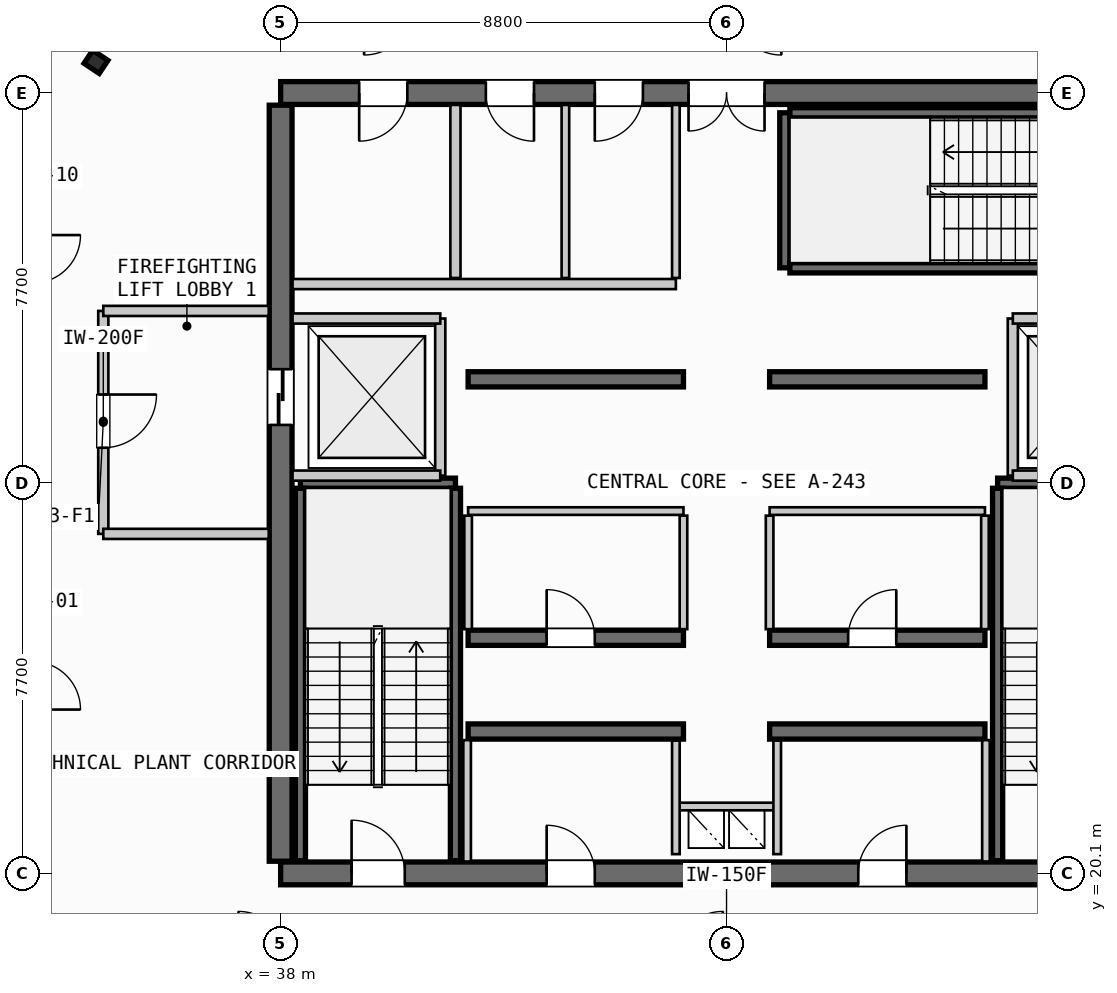
"""IFC4 building model, lengths in metres.
Left out: names, types, materials, properties, quantities, classifications, styles, units other than length and angle.
Written with IfcOpenShell. Run it as: python <this file> out.ifc"""

import sys

from ifc_helpers import new_model, si_unit, direction, frame, frame_2d, origin, origin_2d, place, context, subcontext, project, spatial, rectangle, i_section, extrude, source, transform, mapped, element, fill, save


model = new_model("IFC4")
c1 = context("Model", 3, precision=1e-05, world=origin(), true_north=direction((0.0, 1.0)))
c2 = subcontext(c1, "Body", "Model", "MODEL_VIEW")
j1 = project(units=[si_unit("LENGTHUNIT", "METRE"), si_unit("PLANEANGLEUNIT", "RADIAN")], contexts=[c1])
p1 = place(None, origin())
s1 = spatial("IfcSite", under=j1, at=p1, CompositionType="ELEMENT")
p2 = place(p1, origin())
s2 = spatial("IfcBuilding", under=s1, at=p2, CompositionType="ELEMENT")
p3 = place(p2, frame((0.0, 0.0, 312.3)))
s3 = spatial("IfcBuildingStorey", under=s2, at=p3, CompositionType="ELEMENT", Elevation=312.3)
p4 = place(p3, frame((38.0, 20.1, 0.0), z_axis=(0.0, 0.0, 1.0), x_axis=(1.0, 0.0, 0.0)))
e1 = element("IfcWall", 1, at=p4, inside=s3, PredefinedType="SHEAR", context=c2, shape_type="SweptSolid", body=[
    extrude(rectangle(XDim=17.6, YDim=0.45, at=frame_2d((8.8, 0.0))), origin(), (0.0, 0.0, 1.0), 3.735),
])
p5 = place(p4, frame((1.4, 0.0, 0.0)))
e2 = element("IfcOpeningElement", 2, at=p5, cuts=e1, PredefinedType="OPENING", context=c2, shape_type="SweptSolid", body=[
    extrude(rectangle(XDim=1.05, YDim=2.15, at=frame_2d((0.525, 1.075))), frame((0.0, 0.235, 0.0), z_axis=(0.0, -1.0, 0.0), x_axis=(1.0, 0.0, 0.0)), (0.0, 0.0, 1.0), 0.47),
])
p6 = place(p4, frame((15.15, 0.0, 0.0)))
e3 = element("IfcOpeningElement", 3, at=p6, cuts=e1, PredefinedType="OPENING", context=c2, shape_type="SweptSolid", body=[
    extrude(rectangle(XDim=1.05, YDim=2.15, at=frame_2d((0.525, 1.075))), frame((0.0, 0.235, 0.0), z_axis=(0.0, -1.0, 0.0), x_axis=(1.0, 0.0, 0.0)), (0.0, 0.0, 1.0), 0.47),
])
p7 = place(p4, frame((5.25, 0.0, 0.0)))
e4 = element("IfcOpeningElement", 4, at=p7, cuts=e1, PredefinedType="OPENING", context=c2, shape_type="SweptSolid", body=[
    extrude(rectangle(XDim=0.95, YDim=2.15, at=frame_2d((0.475, 1.075))), frame((0.0, 0.235, 0.0), z_axis=(0.0, -1.0, 0.0), x_axis=(1.0, 0.0, 0.0)), (0.0, 0.0, 1.0), 0.47),
])
p8 = place(p4, frame((11.4, 0.0, 0.0)))
e5 = element("IfcOpeningElement", 5, at=p8, cuts=e1, PredefinedType="OPENING", context=c2, shape_type="SweptSolid", body=[
    extrude(rectangle(XDim=0.95, YDim=2.15, at=frame_2d((0.475, 1.075))), frame((0.0, 0.235, 0.0), z_axis=(0.0, -1.0, 0.0), x_axis=(1.0, 0.0, 0.0)), (0.0, 0.0, 1.0), 0.47),
])
p9 = place(p3, frame((55.6, 35.5, 0.0), z_axis=(0.0, 0.0, 1.0), x_axis=(-1.0, 0.0, 0.0)))
e6 = element("IfcWall", 6, at=p9, inside=s3, PredefinedType="SHEAR", context=c2, shape_type="SweptSolid", body=[
    extrude(rectangle(XDim=17.6, YDim=0.45, at=frame_2d((8.8, 0.0))), origin(), (0.0, 0.0, 1.0), 3.735),
])
p10 = place(p9, frame((8.05, 0.0, 0.0)))
e7 = element("IfcOpeningElement", 7, at=p10, cuts=e6, PredefinedType="OPENING", context=c2, shape_type="SweptSolid", body=[
    extrude(rectangle(XDim=1.5, YDim=2.2, at=frame_2d((0.75, 1.1))), frame((0.0, 0.235, 0.0), z_axis=(0.0, -1.0, 0.0), x_axis=(1.0, 0.0, 0.0)), (0.0, 0.0, 1.0), 0.47),
])
p11 = place(p9, frame((15.1, 0.0, 0.0)))
e8 = element("IfcOpeningElement", 8, at=p11, cuts=e6, PredefinedType="OPENING", context=c2, shape_type="SweptSolid", body=[
    extrude(rectangle(XDim=0.95, YDim=2.15, at=frame_2d((0.475, 1.075))), frame((0.0, 0.235, 0.0), z_axis=(0.0, -1.0, 0.0), x_axis=(1.0, 0.0, 0.0)), (0.0, 0.0, 1.0), 0.47),
])
p12 = place(p9, frame((12.6, 0.0, 0.0)))
e9 = element("IfcOpeningElement", 9, at=p12, cuts=e6, PredefinedType="OPENING", context=c2, shape_type="SweptSolid", body=[
    extrude(rectangle(XDim=0.95, YDim=2.15, at=frame_2d((0.475, 1.075))), frame((0.0, 0.235, 0.0), z_axis=(0.0, -1.0, 0.0), x_axis=(1.0, 0.0, 0.0)), (0.0, 0.0, 1.0), 0.47),
])
p13 = place(p9, frame((10.45, 0.0, 0.0)))
e10 = element("IfcOpeningElement", 10, at=p13, cuts=e6, PredefinedType="OPENING", context=c2, shape_type="SweptSolid", body=[
    extrude(rectangle(XDim=0.95, YDim=2.15, at=frame_2d((0.475, 1.075))), frame((0.0, 0.235, 0.0), z_axis=(0.0, -1.0, 0.0), x_axis=(1.0, 0.0, 0.0)), (0.0, 0.0, 1.0), 0.47),
])
p14 = place(p3, frame((38.0, 35.26, 0.0), z_axis=(0.0, 0.0, 1.0), x_axis=(0.0, -1.0, 0.0)))
e11 = element("IfcWall", 11, at=p14, inside=s3, PredefinedType="SHEAR", context=c2, shape_type="SweptSolid", body=[
    extrude(rectangle(XDim=14.92, YDim=0.45, at=frame_2d((7.46, 0.0))), origin(), (0.0, 0.0, 1.0), 3.735),
])
p15 = place(p14, frame((5.21, 0.0, 0.0)))
e12 = element("IfcOpeningElement", 12, at=p15, cuts=e11, PredefinedType="OPENING", context=c2, shape_type="SweptSolid", body=[
    extrude(rectangle(XDim=1.1, YDim=2.2, at=frame_2d((0.55, 1.1))), frame((0.0, 0.235, 0.0), z_axis=(0.0, -1.0, 0.0), x_axis=(1.0, 0.0, 0.0)), (0.0, 0.0, 1.0), 0.47),
])
for number, where, z_axis, x_axis in (
    (13, (41.7, 22.9, 0.0), (0.0, 0.0, 1.0), (1.0, 0.0, 0.0)),
    (14, (47.65, 22.9, 0.0), (0.0, 0.0, 1.0), (1.0, 0.0, 0.0)),
):
    element("IfcWall", number, at=place(p3, frame(where, z_axis=z_axis, x_axis=x_axis)), inside=s3, PredefinedType="SHEAR", context=c2, shape_type="SweptSolid", body=[
        extrude(rectangle(XDim=4.25, YDim=0.3, at=frame_2d((2.125, 0.0))), origin(), (0.0, 0.0, 1.0), 3.735),
    ])
p16 = place(p3, frame((41.7, 24.75, 0.0), z_axis=(0.0, 0.0, 1.0), x_axis=(1.0, 0.0, 0.0)))
e15 = element("IfcWall", 15, at=p16, inside=s3, PredefinedType="SHEAR", context=c2, shape_type="SweptSolid", body=[
    extrude(rectangle(XDim=4.25, YDim=0.3, at=frame_2d((2.125, 0.0))), origin(), (0.0, 0.0, 1.0), 3.735),
])
p17 = place(p16, frame((1.55, 0.0, 0.0)))
e16 = element("IfcOpeningElement", 16, at=p17, cuts=e15, PredefinedType="OPENING", context=c2, shape_type="SweptSolid", body=[
    extrude(rectangle(XDim=0.95, YDim=2.15, at=frame_2d((0.475, 1.075))), frame((0.0, 0.16, 0.0), z_axis=(0.0, -1.0, 0.0), x_axis=(1.0, 0.0, 0.0)), (0.0, 0.0, 1.0), 0.32),
])
p18 = place(p3, frame((47.65, 24.75, 0.0), z_axis=(0.0, 0.0, 1.0), x_axis=(1.0, 0.0, 0.0)))
e17 = element("IfcWall", 17, at=p18, inside=s3, PredefinedType="SHEAR", context=c2, shape_type="SweptSolid", body=[
    extrude(rectangle(XDim=4.25, YDim=0.3, at=frame_2d((2.125, 0.0))), origin(), (0.0, 0.0, 1.0), 3.735),
])
p19 = place(p18, frame((1.55, 0.0, 0.0)))
e18 = element("IfcOpeningElement", 18, at=p19, cuts=e17, PredefinedType="OPENING", context=c2, shape_type="SweptSolid", body=[
    extrude(rectangle(XDim=0.95, YDim=2.15, at=frame_2d((0.475, 1.075))), frame((0.0, 0.16, 0.0), z_axis=(0.0, -1.0, 0.0), x_axis=(1.0, 0.0, 0.0)), (0.0, 0.0, 1.0), 0.32),
])
for number, where, z_axis, x_axis in (
    (19, (41.7, 29.85, 0.0), (0.0, 0.0, 1.0), (1.0, 0.0, 0.0)),
    (20, (47.65, 29.85, 0.0), (0.0, 0.0, 1.0), (1.0, 0.0, 0.0)),
):
    element("IfcWall", number, at=place(p3, frame(where, z_axis=z_axis, x_axis=x_axis)), inside=s3, PredefinedType="SHEAR", context=c2, shape_type="SweptSolid", body=[
        extrude(rectangle(XDim=4.25, YDim=0.3, at=frame_2d((2.125, 0.0))), origin(), (0.0, 0.0, 1.0), 3.735),
    ])
m1 = source(origin(), c2, "Body", "SweptSolid", [
    extrude(i_section(OverallWidth=0.309, OverallDepth=0.359, WebThickness=0.016, FlangeThickness=0.026, FilletRadius=0.027, at=origin_2d()), origin(), (0.0, 0.0, 1.0), 3.735),
])
p20 = place(p3, frame((34.356, 36.115, 0.0), z_axis=(0.0, 0.0, 1.0), x_axis=(-0.831469612303, 0.55557023302, 0.0)))
e21 = element("IfcColumn", 21, at=p20, inside=s3, PredefinedType="COLUMN", context=c2, shape_type="MappedRepresentation", body=[
    mapped(m1, transform((0.0, 0.0, 0.0), scale=1.0)),
])
p21 = place(p3, frame((38.39, 27.8, 0.0), z_axis=(0.0, 0.0, 1.0), x_axis=(1.0, 0.0, 0.0)))
e22 = element("IfcWall", 22, at=p21, inside=s3, PredefinedType="SHEAR", context=c2, shape_type="SweptSolid", body=[
    extrude(rectangle(XDim=3.06, YDim=0.2, at=frame_2d((1.53, 0.0))), origin(), (0.0, 0.0, 1.0), 3.735),
])
for number, where, z_axis, x_axis in (
    (23, (41.45, 27.7, 0.0), (0.0, 0.0, 1.0), (0.0, -1.0, 0.0)),
    (24, (38.39, 20.35, 0.0), (0.0, 0.0, 1.0), (0.0, 1.0, 0.0)),
):
    element("IfcWall", number, at=place(p3, frame(where, z_axis=z_axis, x_axis=x_axis)), inside=s3, PredefinedType="SHEAR", context=c2, shape_type="SweptSolid", body=[
        extrude(rectangle(XDim=7.35, YDim=0.2, at=frame_2d((3.675, 0.0))), origin(), (0.0, 0.0, 1.0), 3.735),
    ])
p22 = place(p3, frame((52.15, 27.8, 0.0), z_axis=(0.0, 0.0, 1.0), x_axis=(1.0, 0.0, 0.0)))
e25 = element("IfcWall", 25, at=p22, inside=s3, PredefinedType="SHEAR", context=c2, shape_type="SweptSolid", body=[
    extrude(rectangle(XDim=3.06, YDim=0.2, at=frame_2d((1.53, 0.0))), origin(), (0.0, 0.0, 1.0), 3.735),
])
p23 = place(p3, frame((52.15, 20.35, 0.0), z_axis=(0.0, 0.0, 1.0), x_axis=(0.0, 1.0, 0.0)))
e26 = element("IfcWall", 26, at=p23, inside=s3, PredefinedType="SHEAR", context=c2, shape_type="SweptSolid", body=[
    extrude(rectangle(XDim=7.35, YDim=0.2, at=frame_2d((3.675, 0.0))), origin(), (0.0, 0.0, 1.0), 3.735),
])
p24 = place(p3, frame((47.95, 32.05, 0.0), z_axis=(0.0, 0.0, 1.0), x_axis=(0.0, 1.0, 0.0)))
e27 = element("IfcWall", 27, at=p24, inside=s3, PredefinedType="SHEAR", context=c2, shape_type="SweptSolid", body=[
    extrude(rectangle(XDim=3.06, YDim=0.2, at=frame_2d((1.53, 0.0))), origin(), (0.0, 0.0, 1.0), 3.735),
])
for number, where, z_axis, x_axis in (
    (28, (48.05, 35.11, 0.0), (0.0, 0.0, 1.0), (1.0, 0.0, 0.0)),
    (29, (55.4, 32.05, 0.0), (0.0, 0.0, 1.0), (-1.0, 0.0, 0.0)),
):
    element("IfcWall", number, at=place(p3, frame(where, z_axis=z_axis, x_axis=x_axis)), inside=s3, PredefinedType="SHEAR", context=c2, shape_type="SweptSolid", body=[
        extrude(rectangle(XDim=7.35, YDim=0.2, at=frame_2d((3.675, 0.0))), origin(), (0.0, 0.0, 1.0), 3.735),
    ])
p25 = place(p3, frame((45.8, 21.42, 0.0), z_axis=(0.0, 0.0, 1.0), x_axis=(1.0, 0.0, 0.0)))
e30 = element("IfcWall", 30, at=p25, inside=s3, PredefinedType="PARTITIONING", context=c2, shape_type="SweptSolid", body=[
    extrude(rectangle(XDim=2.0, YDim=0.15, at=frame_2d((1.0, 0.0))), origin(), (0.0, 0.0, 1.0), 3.26),
])
for number, where, z_axis, x_axis in (
    (31, (45.8, 20.48, 0.0), (0.0, 0.0, 1.0), (0.0, 1.0, 0.0)),
    (32, (47.8, 20.48, 0.0), (0.0, 0.0, 1.0), (0.0, 1.0, 0.0)),
):
    element("IfcWall", number, at=place(p3, frame(where, z_axis=z_axis, x_axis=x_axis)), inside=s3, PredefinedType="PARTITIONING", context=c2, shape_type="SweptSolid", body=[
        extrude(rectangle(XDim=2.24, YDim=0.15, at=frame_2d((1.12, 0.0))), origin(), (0.0, 0.0, 1.0), 3.26),
    ])
p26 = place(p3, frame((41.15, 27.95, 0.0), z_axis=(0.0, 0.0, 1.0), x_axis=(0.0, 1.0, 0.0)))
e33 = element("IfcWall", 33, at=p26, inside=s3, PredefinedType="PARTITIONING", context=c2, shape_type="SweptSolid", body=[
    extrude(rectangle(XDim=3.1, YDim=0.2, at=frame_2d((1.55, 0.0))), origin(), (0.0, 0.0, 1.0), 3.26),
])
for number, where, z_axis, x_axis in (
    (34, (38.235, 27.95, 0.0), (0.0, 0.0, 1.0), (1.0, 0.0, 0.0)),
    (35, (38.235, 31.05, 0.0), (0.0, 0.0, 1.0), (1.0, 0.0, 0.0)),
):
    element("IfcWall", number, at=place(p3, frame(where, z_axis=z_axis, x_axis=x_axis)), inside=s3, PredefinedType="PARTITIONING", context=c2, shape_type="SweptSolid", body=[
        extrude(rectangle(XDim=2.915, YDim=0.2, at=frame_2d((1.458, 0.0))), origin(), (0.0, 0.0, 1.0), 3.26),
    ])
p27 = place(p3, frame((34.5, 31.2, 0.0), z_axis=(0.0, 0.0, 1.0), x_axis=(0.0, -1.0, 0.0)))
e36 = element("IfcWall", 36, at=p27, inside=s3, PredefinedType="PARTITIONING", context=c2, shape_type="SweptSolid", body=[
    extrude(rectangle(XDim=4.4, YDim=0.2, at=frame_2d((2.2, 0.0))), origin(), (0.0, 0.0, 1.0), 3.26),
])
p28 = place(p27, frame((1.65, 0.0, 0.0)))
e37 = element("IfcOpeningElement", 37, at=p28, cuts=e36, PredefinedType="OPENING", context=c2, shape_type="SweptSolid", body=[
    extrude(rectangle(XDim=1.05, YDim=2.15, at=frame_2d((0.525, 1.075))), frame((0.0, 0.11, 0.0), z_axis=(0.0, -1.0, 0.0), x_axis=(1.0, 0.0, 0.0)), (0.0, 0.0, 1.0), 0.22),
])
for number, where, z_axis, x_axis in (
    (38, (34.5, 26.8, 0.0), (0.0, 0.0, 1.0), (1.0, 0.0, 0.0)),
    (39, (34.5, 31.2, 0.0), (0.0, 0.0, 1.0), (1.0, 0.0, 0.0)),
):
    element("IfcWall", number, at=place(p3, frame(where, z_axis=z_axis, x_axis=x_axis)), inside=s3, PredefinedType="PARTITIONING", context=c2, shape_type="SweptSolid", body=[
        extrude(rectangle(XDim=3.265, YDim=0.2, at=frame_2d((1.632, 0.0))), origin(), (0.0, 0.0, 1.0), 3.26),
    ])
p29 = place(p3, frame((52.45, 27.95, 0.0), z_axis=(0.0, 0.0, 1.0), x_axis=(0.0, 1.0, 0.0)))
e40 = element("IfcWall", 40, at=p29, inside=s3, PredefinedType="PARTITIONING", context=c2, shape_type="SweptSolid", body=[
    extrude(rectangle(XDim=3.1, YDim=0.2, at=frame_2d((1.55, 0.0))), origin(), (0.0, 0.0, 1.0), 3.26),
])
for number, where, z_axis, x_axis in (
    (41, (52.45, 27.95, 0.0), (0.0, 0.0, 1.0), (1.0, 0.0, 0.0)),
    (42, (52.45, 31.05, 0.0), (0.0, 0.0, 1.0), (1.0, 0.0, 0.0)),
):
    element("IfcWall", number, at=place(p3, frame(where, z_axis=z_axis, x_axis=x_axis)), inside=s3, PredefinedType="PARTITIONING", context=c2, shape_type="SweptSolid", body=[
        extrude(rectangle(XDim=2.915, YDim=0.2, at=frame_2d((1.458, 0.0))), origin(), (0.0, 0.0, 1.0), 3.26),
    ])
for number, where, z_axis, x_axis in (
    (43, (41.68, 20.335, 0.0), (0.0, 0.0, 1.0), (0.0, 1.0, 0.0)),
    (44, (51.92, 20.335, 0.0), (0.0, 0.0, 1.0), (0.0, 1.0, 0.0)),
):
    element("IfcWall", number, at=place(p3, frame(where, z_axis=z_axis, x_axis=x_axis)), inside=s3, PredefinedType="PARTITIONING", context=c2, shape_type="SweptSolid", body=[
        extrude(rectangle(XDim=2.395, YDim=0.15, at=frame_2d((1.198, 0.0))), origin(), (0.0, 0.0, 1.0), 3.26),
    ])
for number, where, z_axis, x_axis in (
    (45, (41.7, 27.25, 0.0), (0.0, 0.0, 1.0), (1.0, 0.0, 0.0)),
    (46, (47.65, 27.25, 0.0), (0.0, 0.0, 1.0), (1.0, 0.0, 0.0)),
):
    element("IfcWall", number, at=place(p3, frame(where, z_axis=z_axis, x_axis=x_axis)), inside=s3, PredefinedType="PARTITIONING", context=c2, shape_type="SweptSolid", body=[
        extrude(rectangle(XDim=4.25, YDim=0.15, at=frame_2d((2.125, 0.0))), origin(), (0.0, 0.0, 1.0), 3.26),
    ])
for number, where, z_axis, x_axis in (
    (47, (41.7, 24.92, 0.0), (0.0, 0.0, 1.0), (0.0, 1.0, 0.0)),
    (48, (45.95, 24.92, 0.0), (0.0, 0.0, 1.0), (0.0, 1.0, 0.0)),
    (49, (47.65, 24.92, 0.0), (0.0, 0.0, 1.0), (0.0, 1.0, 0.0)),
    (50, (51.9, 24.92, 0.0), (0.0, 0.0, 1.0), (0.0, 1.0, 0.0)),
):
    element("IfcWall", number, at=place(p3, frame(where, z_axis=z_axis, x_axis=x_axis)), inside=s3, PredefinedType="PARTITIONING", context=c2, shape_type="SweptSolid", body=[
        extrude(rectangle(XDim=2.24, YDim=0.15, at=frame_2d((1.12, 0.0))), origin(), (0.0, 0.0, 1.0), 3.26),
    ])
p30 = place(p3, frame((41.45, 31.85, 0.0), z_axis=(0.0, 0.0, 1.0), x_axis=(0.0, 1.0, 0.0)))
e51 = element("IfcWall", 51, at=p30, inside=s3, PredefinedType="PARTITIONING", context=c2, shape_type="SweptSolid", body=[
    extrude(rectangle(XDim=3.415, YDim=0.2, at=frame_2d((1.708, 0.0))), origin(), (0.0, 0.0, 1.0), 3.26),
])
p31 = place(p3, frame((38.235, 31.73, 0.0), z_axis=(0.0, 0.0, 1.0), x_axis=(1.0, 0.0, 0.0)))
e52 = element("IfcWall", 52, at=p31, inside=s3, PredefinedType="PARTITIONING", context=c2, shape_type="SweptSolid", body=[
    extrude(rectangle(XDim=7.565, YDim=0.2, at=frame_2d((3.782, 0.0))), origin(), (0.0, 0.0, 1.0), 3.26),
])
p32 = place(p3, frame((45.8, 31.85, 0.0), z_axis=(0.0, 0.0, 1.0), x_axis=(0.0, 1.0, 0.0)))
e53 = element("IfcWall", 53, at=p32, inside=s3, PredefinedType="PARTITIONING", context=c2, shape_type="SweptSolid", body=[
    extrude(rectangle(XDim=3.415, YDim=0.15, at=frame_2d((1.708, 0.0))), origin(), (0.0, 0.0, 1.0), 3.26),
])
p33 = place(p3, frame((43.62, 31.85, 0.0), z_axis=(0.0, 0.0, 1.0), x_axis=(0.0, 1.0, 0.0)))
e54 = element("IfcWall", 54, at=p33, inside=s3, PredefinedType="PLUMBINGWALL", context=c2, shape_type="SweptSolid", body=[
    extrude(rectangle(XDim=3.415, YDim=0.15, at=frame_2d((1.708, 0.0))), origin(), (0.0, 0.0, 1.0), 3.26),
])
m2 = source(origin(), c2, "Body", "SweptSolid", [
    extrude(rectangle(XDim=1.05, YDim=2.15, at=frame_2d((0.525, 1.075))), frame((0.0, 0.025, 0.0), z_axis=(0.0, -1.0, 0.0), x_axis=(1.0, 0.0, 0.0)), (0.0, 0.0, 1.0), 0.05),
])
p34 = place(p5, origin())
e55 = element("IfcDoor", 55, at=p34, inside=s3, OperationType="SINGLE_SWING_LEFT", PredefinedType="DOOR", context=c2, shape_type="MappedRepresentation", body=[
    mapped(m2, transform((0.0, 0.0, 0.0), scale=1.0)),
])
fill(e2, e55)
m3 = source(origin(), c2, "Body", "SweptSolid", [
    extrude(rectangle(XDim=1.5, YDim=2.2, at=frame_2d((0.75, 1.1))), frame((0.0, 0.025, 0.0), z_axis=(0.0, -1.0, 0.0), x_axis=(1.0, 0.0, 0.0)), (0.0, 0.0, 1.0), 0.05),
])
p35 = place(p10, origin())
e56 = element("IfcDoor", 56, at=p35, inside=s3, OperationType="DOUBLE_DOOR_SINGLE_SWING", PredefinedType="DOOR", context=c2, shape_type="MappedRepresentation", body=[
    mapped(m3, transform((0.0, 0.0, 0.0), scale=1.0)),
])
fill(e7, e56)
m4 = source(origin(), c2, "Body", "SweptSolid", [
    extrude(rectangle(XDim=1.1, YDim=2.2, at=frame_2d((0.55, 1.1))), frame((0.0, 0.025, 0.0), z_axis=(0.0, -1.0, 0.0), x_axis=(1.0, 0.0, 0.0)), (0.0, 0.0, 1.0), 0.05),
])
p36 = place(p15, origin())
e57 = element("IfcDoor", 57, at=p36, inside=s3, OperationType="SLIDING_TO_LEFT", PredefinedType="DOOR", context=c2, shape_type="MappedRepresentation", body=[
    mapped(m4, transform((0.0, 0.0, 0.0), scale=1.0)),
])
fill(e12, e57)
m5 = source(origin(), c2, "Body", "SweptSolid", [
    extrude(rectangle(XDim=0.95, YDim=2.15, at=frame_2d((0.475, 1.075))), frame((0.0, 0.025, 0.0), z_axis=(0.0, -1.0, 0.0), x_axis=(1.0, 0.0, 0.0)), (0.0, 0.0, 1.0), 0.05),
])
p37 = place(p7, origin())
e58 = element("IfcDoor", 58, at=p37, inside=s3, OperationType="SINGLE_SWING_LEFT", PredefinedType="DOOR", context=c2, shape_type="MappedRepresentation", body=[
    mapped(m5, transform((0.0, 0.0, 0.0), scale=1.0)),
])
fill(e4, e58)
p38 = place(p8, origin())
e59 = element("IfcDoor", 59, at=p38, inside=s3, OperationType="SINGLE_SWING_RIGHT", PredefinedType="DOOR", context=c2, shape_type="MappedRepresentation", body=[
    mapped(m5, transform((0.0, 0.0, 0.0), scale=1.0)),
])
fill(e5, e59)
p39 = place(p17, origin())
e60 = element("IfcDoor", 60, at=p39, inside=s3, OperationType="SINGLE_SWING_LEFT", PredefinedType="DOOR", context=c2, shape_type="MappedRepresentation", body=[
    mapped(m5, transform((0.0, 0.0, 0.0), scale=1.0)),
])
fill(e16, e60)
p40 = place(p19, origin())
e61 = element("IfcDoor", 61, at=p40, inside=s3, OperationType="SINGLE_SWING_RIGHT", PredefinedType="DOOR", context=c2, shape_type="MappedRepresentation", body=[
    mapped(m5, transform((0.0, 0.0, 0.0), scale=1.0)),
])
fill(e18, e61)
p41 = place(p11, origin())
e62 = element("IfcDoor", 62, at=p41, inside=s3, OperationType="SINGLE_SWING_RIGHT", PredefinedType="DOOR", context=c2, shape_type="MappedRepresentation", body=[
    mapped(m5, transform((0.0, 0.0, 0.0), scale=1.0)),
])
fill(e8, e62)
p42 = place(p12, origin())
e63 = element("IfcDoor", 63, at=p42, inside=s3, OperationType="SINGLE_SWING_LEFT", PredefinedType="DOOR", context=c2, shape_type="MappedRepresentation", body=[
    mapped(m5, transform((0.0, 0.0, 0.0), scale=1.0)),
])
fill(e9, e63)
p43 = place(p13, origin())
e64 = element("IfcDoor", 64, at=p43, inside=s3, OperationType="SINGLE_SWING_RIGHT", PredefinedType="DOOR", context=c2, shape_type="MappedRepresentation", body=[
    mapped(m5, transform((0.0, 0.0, 0.0), scale=1.0)),
])
fill(e10, e64)
p44 = place(p28, origin())
e65 = element("IfcDoor", 65, at=p44, inside=s3, OperationType="SINGLE_SWING_LEFT", PredefinedType="DOOR", context=c2, shape_type="MappedRepresentation", body=[
    mapped(m2, transform((0.0, 0.0, 0.0), scale=1.0)),
])
fill(e37, e65)
save(model, sys.argv[1])
